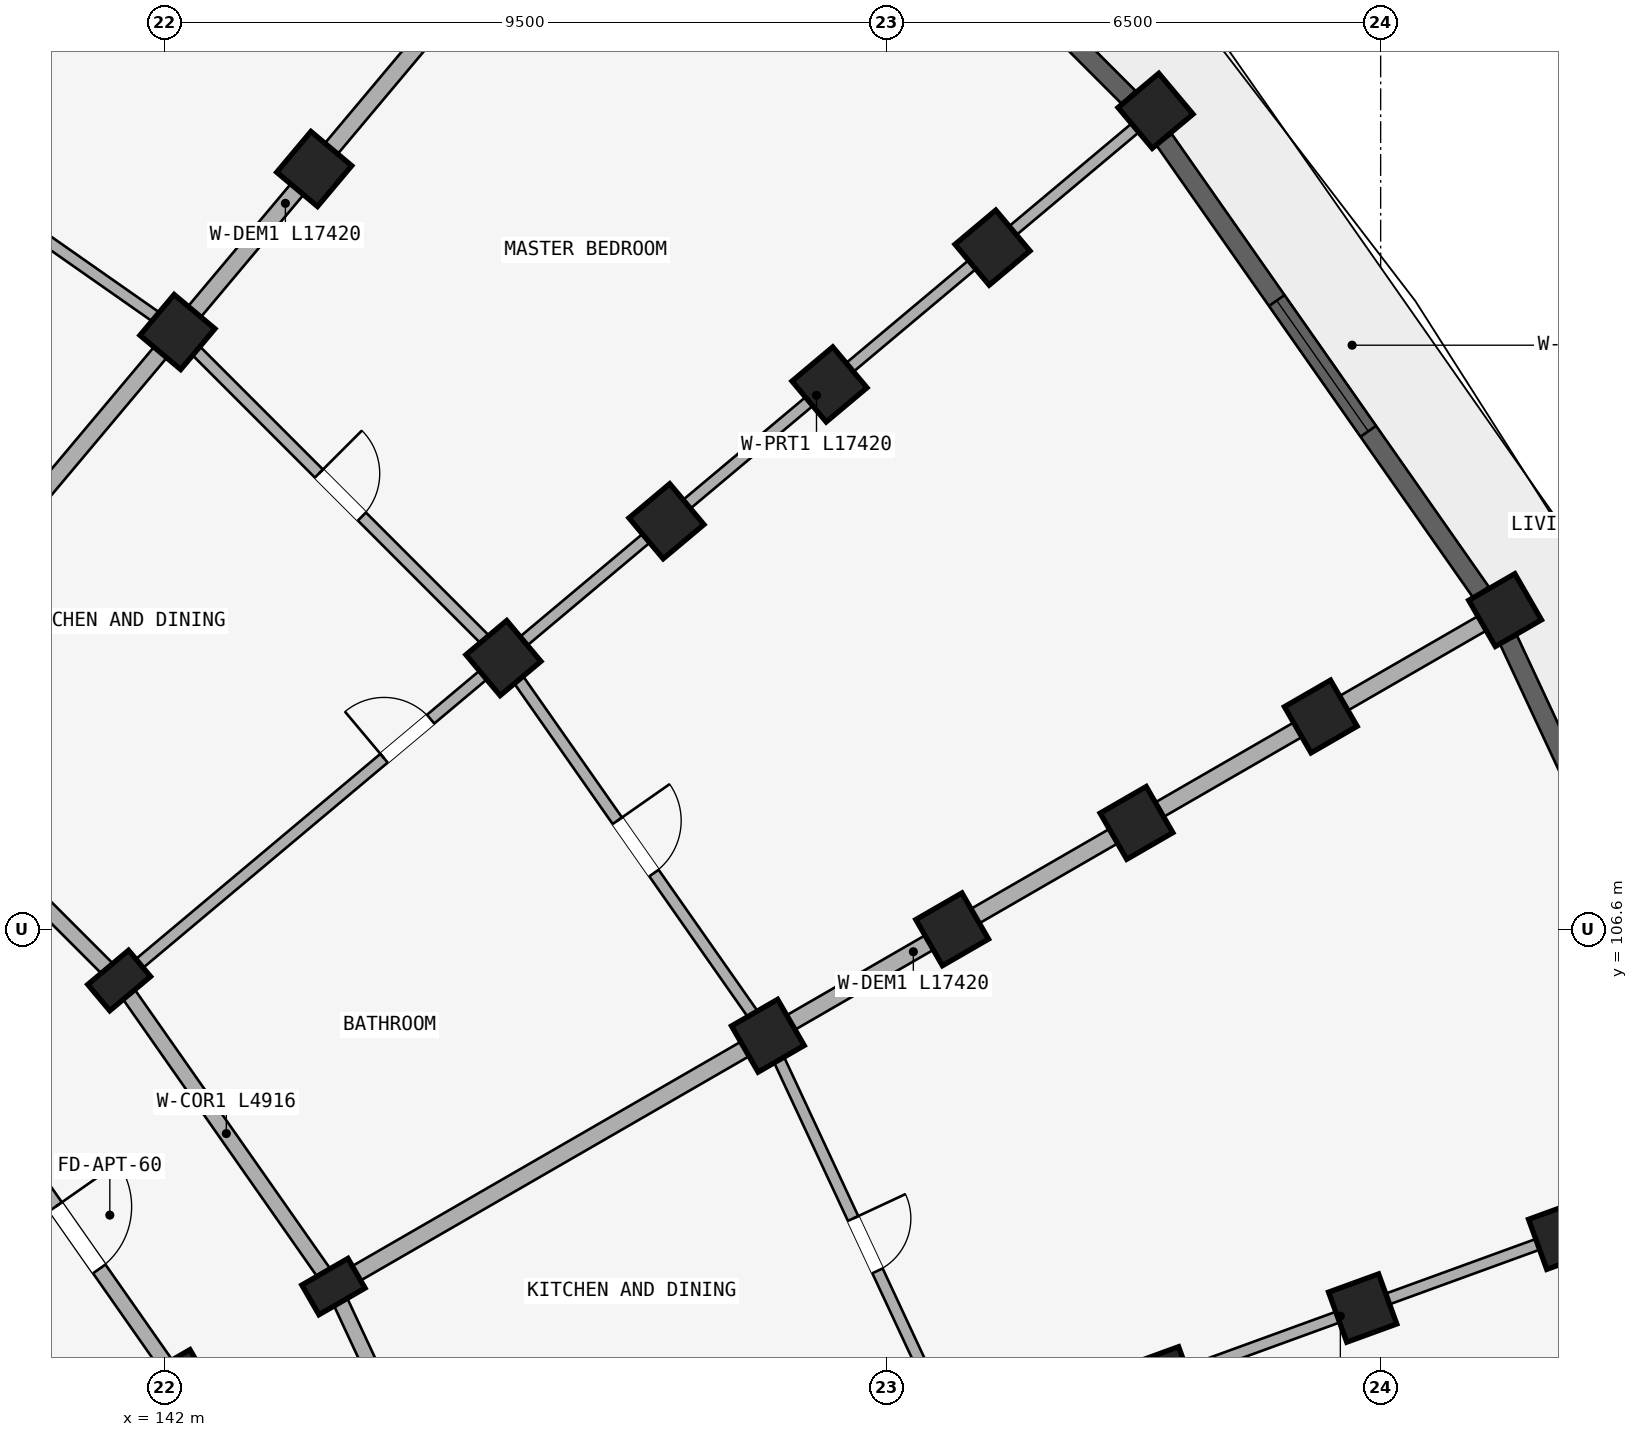
"""IFC4 building model, lengths in metres.
Left out: names, types, materials, properties, quantities, classifications, styles, units other than length and angle.
Written with IfcOpenShell. Run it as: python <this file> out.ifc"""

import sys

from ifc_helpers import new_model, si_unit, direction, frame, frame_2d, origin, origin_2d, place, context, subcontext, project, spatial, rectangle, extrude, element, fill, save


model = new_model("IFC4")
c1 = context("Model", 3, precision=1e-05, world=origin(), true_north=direction((0.0, 1.0)))
c2 = subcontext(c1, "Body", "Model", "MODEL_VIEW")
j1 = project(units=[si_unit("LENGTHUNIT", "METRE"), si_unit("PLANEANGLEUNIT", "RADIAN")], contexts=[c1])
p1 = place(None, origin())
s1 = spatial("IfcSite", under=j1, at=p1, CompositionType="ELEMENT")
p2 = place(p1, origin())
s2 = spatial("IfcBuilding", under=s1, at=p2, CompositionType="ELEMENT")
p3 = place(p2, frame((0.0, 0.0, 18.15)))
s3 = spatial("IfcBuildingStorey", under=s2, at=p3, CompositionType="ELEMENT", Elevation=18.15)
for number, where, z_axis, x_axis in (
    (1, (142.169, 114.458, 0.0), (0.0, 0.0, 1.0), (-0.766, 0.643, 0.0)),
    (2, (143.969, 116.603, 0.0), (0.0, 0.0, 1.0), (-0.766, 0.643, 0.0)),
):
    element("IfcColumn", number, at=place(p3, frame(where, z_axis=z_axis, x_axis=x_axis)), inside=s3, PredefinedType="COLUMN", context=c2, shape_type="SweptSolid", body=[
        extrude(rectangle(XDim=0.7, YDim=0.7, at=origin_2d()), origin(), (0.0, 0.0, 1.0), 2.93),
    ])
p4 = place(p3, frame((141.402, 105.927, 0.0), z_axis=(0.0, 0.0, 1.0), x_axis=(-0.642787609687, 0.766044443119, 0.0)))
e3 = element("IfcColumn", 3, at=p4, inside=s3, PredefinedType="COLUMN", context=c2, shape_type="SweptSolid", body=[
    extrude(rectangle(XDim=0.45, YDim=0.7, at=origin_2d()), origin(), (0.0, 0.0, 1.0), 2.93),
])
for number, where, z_axis, x_axis in (
    (4, (146.458, 110.169, 0.0), (0.0, 0.0, 1.0), (-0.643, 0.766, 0.0)),
    (5, (148.603, 111.969, 0.0), (0.0, 0.0, 1.0), (-0.643, 0.766, 0.0)),
    (6, (150.748, 113.769, 0.0), (0.0, 0.0, 1.0), (-0.643, 0.766, 0.0)),
    (7, (152.893, 115.568, 0.0), (0.0, 0.0, 1.0), (-0.643, 0.766, 0.0)),
    (8, (155.038, 117.368, 0.0), (0.0, 0.0, 1.0), (-0.643, 0.766, 0.0)),
):
    element("IfcColumn", number, at=place(p3, frame(where, z_axis=z_axis, x_axis=x_axis)), inside=s3, PredefinedType="COLUMN", context=c2, shape_type="SweptSolid", body=[
        extrude(rectangle(XDim=0.7, YDim=0.7, at=origin_2d()), origin(), (0.0, 0.0, 1.0), 2.93),
    ])
for number, where, z_axis, x_axis in (
    (9, (142.144, 100.7, 0.0), (0.0, 0.0, 1.0), (-0.5, 0.866, 0.0)),
    (10, (144.222, 101.9, 0.0), (0.0, 0.0, 1.0), (-0.5, 0.866, 0.0)),
):
    element("IfcColumn", number, at=place(p3, frame(where, z_axis=z_axis, x_axis=x_axis)), inside=s3, PredefinedType="COLUMN", context=c2, shape_type="SweptSolid", body=[
        extrude(rectangle(XDim=0.45, YDim=0.7, at=origin_2d()), origin(), (0.0, 0.0, 1.0), 2.93),
    ])
for number, where, z_axis, x_axis in (
    (11, (149.938, 105.2, 0.0), (0.0, 0.0, 1.0), (-0.5, 0.866, 0.0)),
    (12, (152.363, 106.6, 0.0), (0.0, 0.0, 1.0), (-0.5, 0.866, 0.0)),
    (13, (154.787, 108.0, 0.0), (0.0, 0.0, 1.0), (-0.5, 0.866, 0.0)),
    (14, (157.212, 109.4, 0.0), (0.0, 0.0, 1.0), (-0.5, 0.866, 0.0)),
    (15, (159.637, 110.8, 0.0), (0.0, 0.0, 1.0), (-0.5, 0.866, 0.0)),
    (16, (155.132, 100.66, 0.0), (0.0, 0.0, 1.0), (-0.342, 0.94, 0.0)),
    (17, (157.764, 101.618, 0.0), (0.0, 0.0, 1.0), (-0.342, 0.94, 0.0)),
    (18, (160.395, 102.575, 0.0), (0.0, 0.0, 1.0), (-0.342, 0.94, 0.0)),
):
    element("IfcColumn", number, at=place(p3, frame(where, z_axis=z_axis, x_axis=x_axis)), inside=s3, PredefinedType="COLUMN", context=c2, shape_type="SweptSolid", body=[
        extrude(rectangle(XDim=0.7, YDim=0.7, at=origin_2d()), origin(), (0.0, 0.0, 1.0), 2.93),
    ])
p5 = place(p3, frame((137.927, 109.402, 0.0), z_axis=(0.0, 0.0, 1.0), x_axis=(0.707106781187, -0.707106781187, 0.0)))
e19 = element("IfcWall", 19, at=p5, inside=s3, PredefinedType="STANDARD", context=c2, shape_type="SweptSolid", body=[
    extrude(rectangle(XDim=4.916, YDim=0.2, at=frame_2d((2.458, 0.0))), origin(), (0.0, 0.0, 1.0), 2.372),
])
p6 = place(p5, frame((1.938, 0.0, 0.0)))
e20 = element("IfcOpeningElement", 20, at=p6, cuts=e19, PredefinedType="OPENING", context=c2, shape_type="SweptSolid", body=[
    extrude(rectangle(XDim=1.04, YDim=2.15, at=frame_2d((0.52, 1.075))), frame((0.0, 0.11, 0.0), z_axis=(0.0, -1.0, 0.0), x_axis=(1.0, 0.0, 0.0)), (0.0, 0.0, 1.0), 0.22),
])
p7 = place(p3, frame((139.564, 104.384, 0.0), z_axis=(0.0, 0.0, 1.0), x_axis=(0.573571637217, -0.819155404658, 0.0)))
e21 = element("IfcWall", 21, at=p7, inside=s3, PredefinedType="STANDARD", context=c2, shape_type="SweptSolid", body=[
    extrude(rectangle(XDim=4.497, YDim=0.2, at=frame_2d((2.249, 0.0))), origin(), (0.0, 0.0, 1.0), 2.372),
])
p8 = place(p7, frame((1.749, 0.0, 0.0)))
e22 = element("IfcOpeningElement", 22, at=p8, cuts=e21, PredefinedType="OPENING", context=c2, shape_type="SweptSolid", body=[
    extrude(rectangle(XDim=1.0, YDim=2.15, at=frame_2d((0.5, 1.075))), frame((0.0, 0.11, 0.0), z_axis=(0.0, -1.0, 0.0), x_axis=(1.0, 0.0, 0.0)), (0.0, 0.0, 1.0), 0.22),
])
p9 = place(p3, frame((141.402, 105.927, 0.0), z_axis=(0.0, 0.0, 1.0), x_axis=(0.573592335331, -0.819140911474, 0.0)))
e23 = element("IfcWall", 23, at=p9, inside=s3, PredefinedType="STANDARD", context=c2, shape_type="SweptSolid", body=[
    extrude(rectangle(XDim=4.916, YDim=0.2, at=frame_2d((2.458, 0.0))), origin(), (0.0, 0.0, 1.0), 2.372),
])
p10 = place(p3, frame((144.222, 101.9, 0.0), z_axis=(0.0, 0.0, 1.0), x_axis=(0.422629854778, -0.906302381024, 0.0)))
e24 = element("IfcWall", 24, at=p10, inside=s3, PredefinedType="STANDARD", context=c2, shape_type="SweptSolid", body=[
    extrude(rectangle(XDim=4.915, YDim=0.2, at=frame_2d((2.458, 0.0))), origin(), (0.0, 0.0, 1.0), 2.372),
])
p11 = place(p10, frame((1.918, 0.0, 0.0)))
e25 = element("IfcOpeningElement", 25, at=p11, cuts=e24, PredefinedType="OPENING", context=c2, shape_type="SweptSolid", body=[
    extrude(rectangle(XDim=1.08, YDim=2.15, at=frame_2d((0.54, 1.075))), frame((0.0, 0.11, 0.0), z_axis=(0.0, -1.0, 0.0), x_axis=(1.0, 0.0, 0.0)), (0.0, 0.0, 1.0), 0.22),
])
p12 = place(p3, frame((133.95, 112.309, 0.0), z_axis=(0.0, 0.0, 1.0), x_axis=(0.499997843263, 0.866026648973, 0.0)))
e26 = element("IfcWall", 26, at=p12, inside=s3, PredefinedType="PARTITIONING", context=c2, shape_type="SweptSolid", body=[
    extrude(rectangle(XDim=17.42, YDim=0.15, at=frame_2d((8.71, 0.0))), origin(), (0.0, 0.0, 1.0), 2.372),
])
p13 = place(p12, frame((4.45, 0.0, 0.0)))
e27 = element("IfcOpeningElement", 27, at=p13, cuts=e26, PredefinedType="OPENING", context=c2, shape_type="SweptSolid", body=[
    extrude(rectangle(XDim=0.8, YDim=2.1, at=frame_2d((0.4, 1.05))), frame((0.0, 0.085, 0.0), z_axis=(0.0, -1.0, 0.0), x_axis=(1.0, 0.0, 0.0)), (0.0, 0.0, 1.0), 0.17),
])
p14 = place(p3, frame((137.991, 109.479, 0.0), z_axis=(0.0, 0.0, 1.0), x_axis=(0.642784757967, 0.766046835987, 0.0)))
e28 = element("IfcWall", 28, at=p14, inside=s3, PredefinedType="STANDARD", context=c2, shape_type="SweptSolid", body=[
    extrude(rectangle(XDim=17.42, YDim=0.22, at=frame_2d((8.71, 0.0))), origin(), (0.0, 0.0, 1.0), 2.372),
])
p15 = place(p3, frame((141.479, 105.991, 0.0), z_axis=(0.0, 0.0, 1.0), x_axis=(0.766046835987, 0.642784757967, 0.0)))
e29 = element("IfcWall", 29, at=p15, inside=s3, PredefinedType="PARTITIONING", context=c2, shape_type="SweptSolid", body=[
    extrude(rectangle(XDim=17.42, YDim=0.15, at=frame_2d((8.71, 0.0))), origin(), (0.0, 0.0, 1.0), 2.372),
])
p16 = place(p15, frame((4.45, 0.0, 0.0)))
e30 = element("IfcOpeningElement", 30, at=p16, cuts=e29, PredefinedType="OPENING", context=c2, shape_type="SweptSolid", body=[
    extrude(rectangle(XDim=0.8, YDim=2.1, at=frame_2d((0.4, 1.05))), frame((0.0, 0.085, 0.0), z_axis=(0.0, -1.0, 0.0), x_axis=(1.0, 0.0, 0.0)), (0.0, 0.0, 1.0), 0.17),
])
p17 = place(p3, frame((144.309, 101.95, 0.0), z_axis=(0.0, 0.0, 1.0), x_axis=(0.866026648973, 0.499997843263, 0.0)))
e31 = element("IfcWall", 31, at=p17, inside=s3, PredefinedType="STANDARD", context=c2, shape_type="SweptSolid", body=[
    extrude(rectangle(XDim=17.42, YDim=0.22, at=frame_2d((8.71, 0.0))), origin(), (0.0, 0.0, 1.0), 2.372),
])
p18 = place(p3, frame((146.393, 97.479, 0.0), z_axis=(0.0, 0.0, 1.0), x_axis=(0.939691901159, 0.342022120477, 0.0)))
e32 = element("IfcWall", 32, at=p18, inside=s3, PredefinedType="PARTITIONING", context=c2, shape_type="SweptSolid", body=[
    extrude(rectangle(XDim=17.42, YDim=0.15, at=frame_2d((8.71, 0.0))), origin(), (0.0, 0.0, 1.0), 2.372),
])
p19 = place(p18, frame((4.45, 0.0, 0.0)))
e33 = element("IfcOpeningElement", 33, at=p19, cuts=e32, PredefinedType="OPENING", context=c2, shape_type="SweptSolid", body=[
    extrude(rectangle(XDim=0.8, YDim=2.1, at=frame_2d((0.4, 1.05))), frame((0.0, 0.085, 0.0), z_axis=(0.0, -1.0, 0.0), x_axis=(1.0, 0.0, 0.0)), (0.0, 0.0, 1.0), 0.17),
])
p20 = place(p3, frame((137.2, 117.938, 0.0), z_axis=(0.0, 0.0, 1.0), x_axis=(0.81913926159, -0.573594691504, 0.0)))
e34 = element("IfcWall", 34, at=p20, inside=s3, PredefinedType="PLUMBINGWALL", context=c2, shape_type="SweptSolid", body=[
    extrude(rectangle(XDim=6.066, YDim=0.15, at=frame_2d((3.033, 0.0))), origin(), (0.0, 0.0, 1.0), 2.372),
])
p21 = place(p20, frame((2.653, 0.0, 0.0)))
e35 = element("IfcOpeningElement", 35, at=p21, cuts=e34, PredefinedType="OPENING", context=c2, shape_type="SweptSolid", body=[
    extrude(rectangle(XDim=0.76, YDim=2.05, at=frame_2d((0.38, 1.025))), frame((0.0, 0.085, 0.0), z_axis=(0.0, -1.0, 0.0), x_axis=(1.0, 0.0, 0.0)), (0.0, 0.0, 1.0), 0.17),
])
p22 = place(p3, frame((142.169, 114.458, 0.0), z_axis=(0.0, 0.0, 1.0), x_axis=(0.707106781187, -0.707106781187, 0.0)))
e36 = element("IfcWall", 36, at=p22, inside=s3, PredefinedType="PLUMBINGWALL", context=c2, shape_type="SweptSolid", body=[
    extrude(rectangle(XDim=6.066, YDim=0.15, at=frame_2d((3.033, 0.0))), origin(), (0.0, 0.0, 1.0), 2.372),
])
p23 = place(p22, frame((2.633, 0.0, 0.0)))
e37 = element("IfcOpeningElement", 37, at=p23, cuts=e36, PredefinedType="OPENING", context=c2, shape_type="SweptSolid", body=[
    extrude(rectangle(XDim=0.8, YDim=2.1, at=frame_2d((0.4, 1.05))), frame((0.0, 0.085, 0.0), z_axis=(0.0, -1.0, 0.0), x_axis=(1.0, 0.0, 0.0)), (0.0, 0.0, 1.0), 0.17),
])
p24 = place(p3, frame((146.458, 110.169, 0.0), z_axis=(0.0, 0.0, 1.0), x_axis=(0.573594691504, -0.81913926159, 0.0)))
e38 = element("IfcWall", 38, at=p24, inside=s3, PredefinedType="PLUMBINGWALL", context=c2, shape_type="SweptSolid", body=[
    extrude(rectangle(XDim=6.066, YDim=0.15, at=frame_2d((3.033, 0.0))), origin(), (0.0, 0.0, 1.0), 2.372),
])
p25 = place(p24, frame((2.613, 0.0, 0.0)))
e39 = element("IfcOpeningElement", 39, at=p25, cuts=e38, PredefinedType="OPENING", context=c2, shape_type="SweptSolid", body=[
    extrude(rectangle(XDim=0.84, YDim=2.1, at=frame_2d((0.42, 1.05))), frame((0.0, 0.085, 0.0), z_axis=(0.0, -1.0, 0.0), x_axis=(1.0, 0.0, 0.0)), (0.0, 0.0, 1.0), 0.17),
])
p26 = place(p3, frame((149.938, 105.2, 0.0), z_axis=(0.0, 0.0, 1.0), x_axis=(0.42260781991, -0.906312656069, 0.0)))
e40 = element("IfcWall", 40, at=p26, inside=s3, PredefinedType="PLUMBINGWALL", context=c2, shape_type="SweptSolid", body=[
    extrude(rectangle(XDim=6.066, YDim=0.15, at=frame_2d((3.033, 0.0))), origin(), (0.0, 0.0, 1.0), 2.372),
])
p27 = place(p26, frame((2.653, 0.0, 0.0)))
e41 = element("IfcOpeningElement", 41, at=p27, cuts=e40, PredefinedType="OPENING", context=c2, shape_type="SweptSolid", body=[
    extrude(rectangle(XDim=0.76, YDim=2.05, at=frame_2d((0.38, 1.025))), frame((0.0, 0.085, 0.0), z_axis=(0.0, -1.0, 0.0), x_axis=(1.0, 0.0, 0.0)), (0.0, 0.0, 1.0), 0.17),
])
p28 = place(p3, frame((149.546, 122.684, 0.0), z_axis=(0.0, 0.0, 1.0), x_axis=(0.707106781187, -0.707106781187, 0.0)))
e42 = element("IfcWall", 42, at=p28, inside=s3, PredefinedType="STANDARD", context=c2, shape_type="SweptSolid", body=[
    extrude(rectangle(XDim=7.267, YDim=0.25, at=frame_2d((3.633, 0.0))), origin(), (0.0, 0.0, 1.0), 2.372),
])
p29 = place(p28, frame((4.766, 0.0, 0.522)))
e43 = element("IfcOpeningElement", 43, at=p29, cuts=e42, PredefinedType="OPENING", context=c2, shape_type="SweptSolid", body=[
    extrude(rectangle(XDim=1.2, YDim=1.5, at=frame_2d((0.6, 0.75))), frame((0.0, 0.135, 0.0), z_axis=(0.0, -1.0, 0.0), x_axis=(1.0, 0.0, 0.0)), (0.0, 0.0, 1.0), 0.27),
])
p30 = place(p28, frame((1.913, 0.0, 0.0)))
e44 = element("IfcOpeningElement", 44, at=p30, cuts=e42, PredefinedType="OPENING", context=c2, shape_type="SweptSolid", body=[
    extrude(rectangle(XDim=1.26, YDim=2.15, at=frame_2d((0.63, 1.075))), frame((0.0, 0.135, 0.0), z_axis=(0.0, -1.0, 0.0), x_axis=(1.0, 0.0, 0.0)), (0.0, 0.0, 1.0), 0.27),
])
p31 = place(p3, frame((155.151, 116.989, 0.0), z_axis=(0.0, 0.0, 1.0), x_axis=(0.573566061701, -0.819159308599, 0.0)))
e45 = element("IfcWall", 45, at=p31, inside=s3, PredefinedType="STANDARD", context=c2, shape_type="SweptSolid", body=[
    extrude(rectangle(XDim=7.267, YDim=0.25, at=frame_2d((3.633, 0.0))), origin(), (0.0, 0.0, 1.0), 2.372),
])
p32 = place(p31, frame((2.583, 0.0, 0.372)))
e46 = element("IfcOpeningElement", 46, at=p32, cuts=e45, PredefinedType="OPENING", context=c2, shape_type="SweptSolid", body=[
    extrude(rectangle(XDim=2.1, YDim=1.8, at=frame_2d((1.05, 0.9))), frame((0.0, 0.135, 0.0), z_axis=(0.0, -1.0, 0.0), x_axis=(1.0, 0.0, 0.0)), (0.0, 0.0, 1.0), 0.27),
])
p33 = place(p3, frame((159.683, 110.406, 0.0), z_axis=(0.0, 0.0, 1.0), x_axis=(0.422627946127, -0.90630327107, 0.0)))
e47 = element("IfcWall", 47, at=p33, inside=s3, PredefinedType="STANDARD", context=c2, shape_type="SweptSolid", body=[
    extrude(rectangle(XDim=7.267, YDim=0.25, at=frame_2d((3.633, 0.0))), origin(), (0.0, 0.0, 1.0), 2.372),
])
p34 = place(p33, frame((2.658, 0.0, 0.322)))
e48 = element("IfcOpeningElement", 48, at=p34, cuts=e47, PredefinedType="OPENING", context=c2, shape_type="SweptSolid", body=[
    extrude(rectangle(XDim=1.95, YDim=1.85, at=frame_2d((0.975, 0.925))), frame((0.0, 0.135, 0.0), z_axis=(0.0, -1.0, 0.0), x_axis=(1.0, 0.0, 0.0)), (0.0, 0.0, 1.0), 0.27),
])
p35 = place(p32, origin())
e49 = element("IfcWindow", 49, at=p35, inside=s3, PartitioningType="TRIPLE_PANEL_VERTICAL", PredefinedType="WINDOW", context=c2, shape_type="SweptSolid", body=[
    extrude(rectangle(XDim=2.1, YDim=1.8, at=frame_2d((1.05, 0.9))), frame((0.0, 0.03, 0.0), z_axis=(0.0, -1.0, 0.0), x_axis=(1.0, 0.0, 0.0)), (0.0, 0.0, 1.0), 0.06),
])
fill(e46, e49)
p36 = place(p16, frame((0.8, 0.0, 0.0), z_axis=(0.0, 0.0, 1.0), x_axis=(-1.0, 0.0, 0.0)))
e50 = element("IfcDoor", 50, at=p36, inside=s3, OperationType="SINGLE_SWING_RIGHT", PredefinedType="DOOR", context=c2, shape_type="SweptSolid", body=[
    extrude(rectangle(XDim=0.8, YDim=2.1, at=frame_2d((0.4, 1.05))), frame((0.0, 0.025, 0.0), z_axis=(0.0, -1.0, 0.0), x_axis=(1.0, 0.0, 0.0)), (0.0, 0.0, 1.0), 0.05),
])
fill(e30, e50)
p37 = place(p23, frame((0.8, 0.0, 0.0), z_axis=(0.0, 0.0, 1.0), x_axis=(-1.0, 0.0, 0.0)))
e51 = element("IfcDoor", 51, at=p37, inside=s3, OperationType="SINGLE_SWING_RIGHT", PredefinedType="DOOR", context=c2, shape_type="SweptSolid", body=[
    extrude(rectangle(XDim=0.8, YDim=2.1, at=frame_2d((0.4, 1.05))), frame((0.0, 0.025, 0.0), z_axis=(0.0, -1.0, 0.0), x_axis=(1.0, 0.0, 0.0)), (0.0, 0.0, 1.0), 0.05),
])
fill(e37, e51)
p38 = place(p25, origin())
e52 = element("IfcDoor", 52, at=p38, inside=s3, OperationType="SINGLE_SWING_LEFT", PredefinedType="DOOR", context=c2, shape_type="SweptSolid", body=[
    extrude(rectangle(XDim=0.84, YDim=2.1, at=frame_2d((0.42, 1.05))), frame((0.0, 0.025, 0.0), z_axis=(0.0, -1.0, 0.0), x_axis=(1.0, 0.0, 0.0)), (0.0, 0.0, 1.0), 0.05),
])
fill(e39, e52)
p39 = place(p27, origin())
e53 = element("IfcDoor", 53, at=p39, inside=s3, OperationType="SINGLE_SWING_LEFT", PredefinedType="DOOR", context=c2, shape_type="SweptSolid", body=[
    extrude(rectangle(XDim=0.76, YDim=2.05, at=frame_2d((0.38, 1.025))), frame((0.0, 0.025, 0.0), z_axis=(0.0, -1.0, 0.0), x_axis=(1.0, 0.0, 0.0)), (0.0, 0.0, 1.0), 0.05),
])
fill(e41, e53)
p40 = place(p8, frame((1.0, 0.0, 0.0), z_axis=(0.0, 0.0, 1.0), x_axis=(-1.0, 0.0, 0.0)))
e54 = element("IfcDoor", 54, at=p40, inside=s3, OperationType="SINGLE_SWING_RIGHT", PredefinedType="DOOR", context=c2, shape_type="SweptSolid", body=[
    extrude(rectangle(XDim=1.0, YDim=2.15, at=frame_2d((0.5, 1.075))), frame((0.0, 0.025, 0.0), z_axis=(0.0, -1.0, 0.0), x_axis=(1.0, 0.0, 0.0)), (0.0, 0.0, 1.0), 0.05),
])
fill(e22, e54)
save(model, sys.argv[1])
